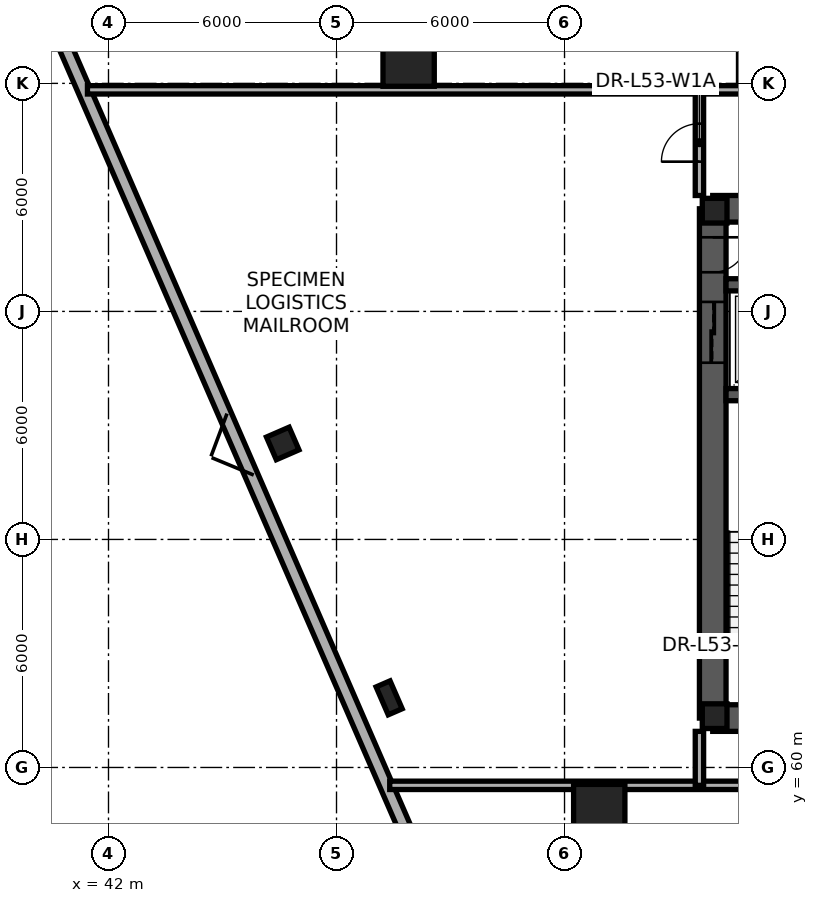
"""IFC4 building model, lengths in metres.
Left out: names, types, materials, properties, quantities, classifications, styles, units other than length and angle.
Written with IfcOpenShell. Run it as: python <this file> out.ifc"""

import sys

from ifc_helpers import new_model, si_unit, direction, frame, frame_2d, origin, origin_2d, place, context, subcontext, project, spatial, rectangle, extrude, element, fill, save


model = new_model("IFC4")
c1 = context("Model", 3, precision=1e-05, world=origin(), true_north=direction((0.0, 1.0)))
c2 = subcontext(c1, "Body", "Model", "MODEL_VIEW")
j1 = project(units=[si_unit("LENGTHUNIT", "METRE"), si_unit("PLANEANGLEUNIT", "RADIAN")], contexts=[c1])
p1 = place(None, origin())
s1 = spatial("IfcSite", under=j1, at=p1, CompositionType="ELEMENT")
p2 = place(p1, origin())
s2 = spatial("IfcBuilding", under=s1, at=p2, CompositionType="ELEMENT")
p3 = place(p2, frame((0.0, 0.0, 201.3)))
s3 = spatial("IfcBuildingStorey", under=s2, at=p3, CompositionType="ELEMENT", Elevation=201.3)
p4 = place(p3, frame((57.9, 61.3, 0.0), z_axis=(0.0, 0.0, 1.0), x_axis=(1.0, 0.0, 0.0)))
e1 = element("IfcWall", 1, at=p4, inside=s3, PredefinedType="SHEAR", context=c2, shape_type="SweptSolid", body=[
    extrude(rectangle(XDim=16.2, YDim=0.7, at=frame_2d((8.1, 0.0))), origin(), (0.0, 0.0, 1.0), 3.65),
])
p5 = place(p4, frame((1.35, 0.0, 0.0)))
e2 = element("IfcOpeningElement", 2, at=p5, cuts=e1, PredefinedType="OPENING", context=c2, shape_type="SweptSolid", body=[
    extrude(rectangle(XDim=1.15, YDim=2.15, at=frame_2d((0.575, 1.075))), frame((0.0, 0.36, 0.0), z_axis=(0.0, -1.0, 0.0), x_axis=(1.0, 0.0, 0.0)), (0.0, 0.0, 1.0), 0.72),
])
p6 = place(p4, frame((6.1, 0.0, 0.0)))
e3 = element("IfcOpeningElement", 3, at=p6, cuts=e1, PredefinedType="OPENING", context=c2, shape_type="SweptSolid", body=[
    extrude(rectangle(XDim=1.6, YDim=2.15, at=frame_2d((0.8, 1.075))), frame((0.0, 0.36, 0.0), z_axis=(0.0, -1.0, 0.0), x_axis=(1.0, 0.0, 0.0)), (0.0, 0.0, 1.0), 0.72),
])
p7 = place(p4, frame((13.55, 0.0, 0.0)))
e4 = element("IfcOpeningElement", 4, at=p7, cuts=e1, PredefinedType="OPENING", context=c2, shape_type="SweptSolid", body=[
    extrude(rectangle(XDim=1.15, YDim=2.15, at=frame_2d((0.575, 1.075))), frame((0.0, 0.36, 0.0), z_axis=(0.0, -1.0, 0.0), x_axis=(1.0, 0.0, 0.0)), (0.0, 0.0, 1.0), 0.72),
])
p8 = place(p3, frame((64.85, 74.7, 0.0), z_axis=(0.0, 0.0, 1.0), x_axis=(-1.0, 0.0, 0.0)))
e5 = element("IfcWall", 5, at=p8, inside=s3, PredefinedType="SHEAR", context=c2, shape_type="SweptSolid", body=[
    extrude(rectangle(XDim=6.95, YDim=0.7, at=frame_2d((3.475, 0.0))), origin(), (0.0, 0.0, 1.0), 3.65),
])
p9 = place(p3, frame((57.9, 74.7, 0.0), z_axis=(0.0, 0.0, 1.0), x_axis=(0.0, -1.0, 0.0)))
e6 = element("IfcWall", 6, at=p9, inside=s3, PredefinedType="SHEAR", context=c2, shape_type="SweptSolid", body=[
    extrude(rectangle(XDim=13.4, YDim=0.7, at=frame_2d((6.7, 0.0))), origin(), (0.0, 0.0, 1.0), 3.65),
])
p10 = place(p9, frame((0.75, 0.0, 0.0)))
e7 = element("IfcOpeningElement", 7, at=p10, cuts=e6, PredefinedType="OPENING", context=c2, shape_type="SweptSolid", body=[
    extrude(rectangle(XDim=0.92, YDim=2.05, at=frame_2d((0.46, 1.025))), frame((0.0, 0.36, 0.0), z_axis=(0.0, -1.0, 0.0), x_axis=(1.0, 0.0, 0.0)), (0.0, 0.0, 1.0), 0.72),
])
p11 = place(p9, frame((2.45, 0.0, 0.0)))
e8 = element("IfcOpeningElement", 8, at=p11, cuts=e6, PredefinedType="OPENING", context=c2, shape_type="SweptSolid", body=[
    extrude(rectangle(XDim=1.6, YDim=2.3, at=frame_2d((0.8, 1.15))), frame((0.0, 0.36, 0.0), z_axis=(0.0, -1.0, 0.0), x_axis=(1.0, 0.0, 0.0)), (0.0, 0.0, 1.0), 0.72),
])
for number, where, z_axis, x_axis in (
    (9, (58.25, 69.81, 0.0), (0.0, 0.0, 1.0), (1.0, 0.0, 0.0)),
    (10, (58.25, 72.7, 0.0), (0.0, 0.0, 1.0), (1.0, 0.0, 0.0)),
):
    element("IfcWall", number, at=place(p3, frame(where, z_axis=z_axis, x_axis=x_axis)), inside=s3, PredefinedType="SHEAR", context=c2, shape_type="SweptSolid", body=[
        extrude(rectangle(XDim=3.84, YDim=0.32, at=frame_2d((1.92, 0.0))), origin(), (0.0, 0.0, 1.0), 3.65),
    ])
for number, where, z_axis, x_axis in (
    (11, (57.95, 61.35, 0.0), (0.0, 0.0, 1.0), (1.0, 0.0, 0.0)),
    (12, (57.95, 74.65, 0.0), (0.0, 0.0, 1.0), (1.0, 0.0, 0.0)),
):
    element("IfcColumn", number, at=place(p3, frame(where, z_axis=z_axis, x_axis=x_axis)), inside=s3, PredefinedType="COLUMN", context=c2, shape_type="SweptSolid", body=[
        extrude(rectangle(XDim=0.65, YDim=0.65, at=origin_2d()), origin(), (0.0, 0.0, 1.0), 3.65),
    ])
for number, where, z_axis, x_axis in (
    (13, (49.898, 78.599, 0.0), (0.0, 0.0, 1.0), (1.0, 0.0, 0.0)),
    (14, (54.914, 58.88, 0.0), (0.0, 0.0, 1.0), (1.0, 0.0, 0.0)),
):
    element("IfcColumn", number, at=place(p3, frame(where, z_axis=z_axis, x_axis=x_axis)), inside=s3, PredefinedType="COLUMN", context=c2, shape_type="SweptSolid", body=[
        extrude(rectangle(XDim=1.35, YDim=1.35, at=origin_2d()), origin(), (0.0, 0.0, 1.0), 3.65),
    ])
p12 = place(p3, frame((46.513, 68.536, 0.003), z_axis=(0.039229493406, -0.00569028488, 0.999214024874), x_axis=(0.964102718785, 0.263029272367, -0.036353122408)))
e15 = element("IfcColumn", 15, at=p12, inside=s3, PredefinedType="COLUMN", context=c2, shape_type="SweptSolid", body=[
    extrude(rectangle(XDim=0.65, YDim=0.65, at=origin_2d()), origin(), (0.0, 0.0, 1.0), 3.647),
])
p13 = place(p3, frame((49.327, 61.813, 0.003), z_axis=(0.031939586172, 0.010512610124, 0.999434514045), x_axis=(0.745965975562, 0.665269751672, -0.030837003977)))
e16 = element("IfcColumn", 16, at=p13, inside=s3, PredefinedType="PILASTER", context=c2, shape_type="SweptSolid", body=[
    extrude(rectangle(XDim=0.8, YDim=0.4, at=origin_2d()), origin(), (0.0, 0.0, 1.0), 3.646),
])
p14 = place(p3, frame((61.231, 32.098, 0.0), z_axis=(0.0, 0.0, 1.0), x_axis=(-0.398627130257, 0.917113085188, 0.0)))
e17 = element("IfcWall", 17, at=p14, inside=s3, PredefinedType="STANDARD", context=c2, shape_type="SweptSolid", body=[
    extrude(rectangle(XDim=51.591, YDim=0.34, at=frame_2d((25.795, 0.0))), origin(), (0.0, 0.0, 1.0), 0.85),
])
p15 = place(p3, frame((41.446, 77.83, 0.0), z_axis=(0.0, 0.0, 1.0), x_axis=(1.0, 0.0, 0.0)))
e18 = element("IfcWall", 18, at=p15, inside=s3, PredefinedType="PARTITIONING", context=c2, shape_type="SweptSolid", body=[
    extrude(rectangle(XDim=49.108, YDim=0.22, at=frame_2d((24.554, 0.0))), origin(), (0.0, 0.0, 1.0), 2.6),
])
p16 = place(p15, frame((18.114, 0.0, 0.0)))
e19 = element("IfcOpeningElement", 19, at=p16, cuts=e18, PredefinedType="OPENING", context=c2, shape_type="SweptSolid", body=[
    extrude(rectangle(XDim=0.98, YDim=2.1, at=frame_2d((0.49, 1.05))), frame((0.0, 0.12, 0.0), z_axis=(0.0, -1.0, 0.0), x_axis=(1.0, 0.0, 0.0)), (0.0, 0.0, 1.0), 0.24),
])
p17 = place(p15, frame((20.939, 0.0, 0.0)))
e20 = element("IfcOpeningElement", 20, at=p17, cuts=e18, PredefinedType="OPENING", context=c2, shape_type="SweptSolid", body=[
    extrude(rectangle(XDim=0.98, YDim=2.1, at=frame_2d((0.49, 1.05))), frame((0.0, 0.12, 0.0), z_axis=(0.0, -1.0, 0.0), x_axis=(1.0, 0.0, 0.0)), (0.0, 0.0, 1.0), 0.24),
])
p18 = place(p15, frame((31.676, 0.0, 0.0)))
e21 = element("IfcOpeningElement", 21, at=p18, cuts=e18, PredefinedType="OPENING", context=c2, shape_type="SweptSolid", body=[
    extrude(rectangle(XDim=1.0, YDim=2.1, at=frame_2d((0.5, 1.05))), frame((0.0, 0.12, 0.0), z_axis=(0.0, -1.0, 0.0), x_axis=(1.0, 0.0, 0.0)), (0.0, 0.0, 1.0), 0.24),
])
p19 = place(p3, frame((49.4, 59.53, 0.0), z_axis=(0.0, 0.0, 1.0), x_axis=(1.0, 0.0, 0.0)))
e22 = element("IfcWall", 22, at=p19, inside=s3, PredefinedType="PARTITIONING", context=c2, shape_type="SweptSolid", body=[
    extrude(rectangle(XDim=30.637, YDim=0.22, at=frame_2d((15.319, 0.0))), origin(), (0.0, 0.0, 1.0), 2.6),
])
p20 = place(p19, frame((9.375, 0.0, 0.0)))
e23 = element("IfcOpeningElement", 23, at=p20, cuts=e22, PredefinedType="OPENING", context=c2, shape_type="SweptSolid", body=[
    extrude(rectangle(XDim=1.5, YDim=2.2, at=frame_2d((0.75, 1.1))), frame((0.0, 0.12, 0.0), z_axis=(0.0, -1.0, 0.0), x_axis=(1.0, 0.0, 0.0)), (0.0, 0.0, 1.0), 0.24),
])
p21 = place(p19, frame((24.544, 0.0, 0.0)))
e24 = element("IfcOpeningElement", 24, at=p21, cuts=e22, PredefinedType="OPENING", context=c2, shape_type="SweptSolid", body=[
    extrude(rectangle(XDim=1.5, YDim=2.2, at=frame_2d((0.75, 1.1))), frame((0.0, 0.12, 0.0), z_axis=(0.0, -1.0, 0.0), x_axis=(1.0, 0.0, 0.0)), (0.0, 0.0, 1.0), 0.24),
])
p22 = place(p3, frame((57.55, 75.05, 0.0), z_axis=(0.0, 0.0, 1.0), x_axis=(0.0, 1.0, 0.0)))
e25 = element("IfcWall", 25, at=p22, inside=s3, PredefinedType="PARTITIONING", context=c2, shape_type="SweptSolid", body=[
    extrude(rectangle(XDim=2.78, YDim=0.22, at=frame_2d((1.39, 0.0))), origin(), (0.0, 0.0, 1.0), 2.78),
])
p23 = place(p22, frame((0.89, 0.0, 0.0)))
e26 = element("IfcOpeningElement", 26, at=p23, cuts=e25, PredefinedType="OPENING", context=c2, shape_type="SweptSolid", body=[
    extrude(rectangle(XDim=1.0, YDim=2.1, at=frame_2d((0.5, 1.05))), frame((0.0, 0.12, 0.0), z_axis=(0.0, -1.0, 0.0), x_axis=(1.0, 0.0, 0.0)), (0.0, 0.0, 1.0), 0.24),
])
p24 = place(p3, frame((57.55, 59.53, 0.0), z_axis=(0.0, 0.0, 1.0), x_axis=(0.0, 1.0, 0.0)))
e27 = element("IfcWall", 27, at=p24, inside=s3, PredefinedType="PARTITIONING", context=c2, shape_type="SweptSolid", body=[
    extrude(rectangle(XDim=1.42, YDim=0.22, at=frame_2d((0.71, 0.0))), origin(), (0.0, 0.0, 1.0), 2.78),
])
p25 = place(p10, origin())
e28 = element("IfcDoor", 28, at=p25, inside=s3, OperationType="SINGLE_SWING_LEFT", PredefinedType="DOOR", context=c2, shape_type="SweptSolid", body=[
    extrude(rectangle(XDim=0.92, YDim=2.05, at=frame_2d((0.46, 1.025))), frame((0.0, 0.025, 0.0), z_axis=(0.0, -1.0, 0.0), x_axis=(1.0, 0.0, 0.0)), (0.0, 0.0, 1.0), 0.05),
])
fill(e7, e28)
p26 = place(p11, origin())
e29 = element("IfcDoor", 29, at=p26, inside=s3, OperationType="DOUBLE_DOOR_SLIDING", PredefinedType="DOOR", context=c2, shape_type="SweptSolid", body=[
    extrude(rectangle(XDim=1.6, YDim=2.3, at=frame_2d((0.8, 1.15))), frame((0.0, 0.025, 0.0), z_axis=(0.0, -1.0, 0.0), x_axis=(1.0, 0.0, 0.0)), (0.0, 0.0, 1.0), 0.05),
])
fill(e8, e29)
p27 = place(p23, origin())
e30 = element("IfcDoor", 30, at=p27, inside=s3, OperationType="SINGLE_SWING_LEFT", PredefinedType="DOOR", context=c2, shape_type="SweptSolid", body=[
    extrude(rectangle(XDim=1.0, YDim=2.1, at=frame_2d((0.5, 1.05))), frame((0.0, 0.025, 0.0), z_axis=(0.0, -1.0, 0.0), x_axis=(1.0, 0.0, 0.0)), (0.0, 0.0, 1.0), 0.05),
])
fill(e26, e30)
save(model, sys.argv[1])
